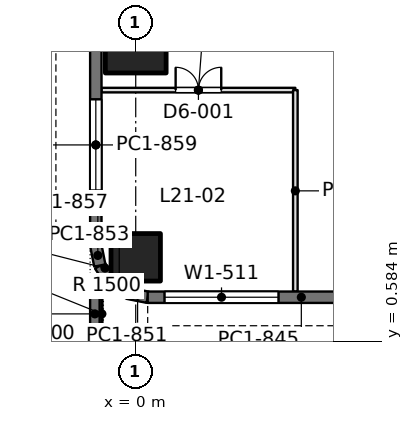
"""IFC4 building model, lengths in metres.
Left out: names, types, materials, properties, quantities, classifications, styles, units other than length and angle.
Written with IfcOpenShell. Run it as: python <this file> out.ifc"""

import sys

from ifc_helpers import new_model, si_unit, direction, frame, frame_2d, origin, origin_2d, place, context, subcontext, project, spatial, rectangle, extrude, element, fill, save


model = new_model("IFC4")
c1 = context("Model", 3, precision=1e-05, world=origin(), true_north=direction((0.0, 1.0)))
c2 = subcontext(c1, "Body", "Model", "MODEL_VIEW")
j1 = project(units=[si_unit("LENGTHUNIT", "METRE"), si_unit("PLANEANGLEUNIT", "RADIAN")], contexts=[c1])
p1 = place(None, origin())
s1 = spatial("IfcSite", under=j1, at=p1, CompositionType="ELEMENT")
p2 = place(p1, origin())
s2 = spatial("IfcBuilding", under=s1, at=p2, CompositionType="ELEMENT")
p3 = place(p2, frame((0.0, 0.0, 96.3)))
s3 = spatial("IfcBuildingStorey", under=s2, at=p3, CompositionType="ELEMENT", Elevation=96.3)
p4 = place(p3, frame((0.0, 2.8, -0.36), z_axis=(0.0, 0.0, 1.0), x_axis=(1.0, 0.0, 0.0)))
e1 = element("IfcColumn", 1, at=p4, inside=s3, PredefinedType="COLUMN", context=c2, shape_type="SweptSolid", body=[
    extrude(rectangle(XDim=1.3, YDim=1.25, at=origin_2d()), origin(), (0.0, 0.0, 1.0), 4.86),
])
p5 = place(p3, frame((0.0, 8.4, 0.0), z_axis=(0.0, 0.0, 1.0), x_axis=(0.0, 1.0, 0.0)))
e2 = element("IfcColumn", 2, at=p5, inside=s3, PredefinedType="COLUMN", context=c2, shape_type="SweptSolid", body=[
    extrude(rectangle(XDim=1.5, YDim=1.6, at=origin_2d()), origin(), (0.0, 0.0, 1.0), 4.5),
])
p6 = place(p3, frame((8.4, 1.75, 0.0), z_axis=(0.0, 0.0, 1.0), x_axis=(-1.0, 0.0, 0.0)))
e3 = element("IfcWall", 3, at=p6, inside=s3, PredefinedType="SOLIDWALL", context=c2, shape_type="SweptSolid", body=[
    extrude(rectangle(XDim=8.085, YDim=0.3, at=frame_2d((4.042, 0.0))), origin(), (0.0, 0.0, 1.0), 4.35),
])
p7 = place(p6, frame((4.643, 0.0, 0.9)))
e4 = element("IfcOpeningElement", 4, at=p7, cuts=e3, PredefinedType="OPENING", context=c2, shape_type="SweptSolid", body=[
    extrude(rectangle(XDim=3.0, YDim=1.9, at=frame_2d((1.5, 0.95))), frame((0.0, 0.16, 0.0), z_axis=(0.0, -1.0, 0.0), x_axis=(1.0, 0.0, 0.0)), (0.0, 0.0, 1.0), 0.32),
])
p8 = place(p6, frame((1.443, 0.0, 0.0)))
e5 = element("IfcOpeningElement", 5, at=p8, cuts=e3, PredefinedType="OPENING", context=c2, shape_type="SweptSolid", body=[
    extrude(rectangle(XDim=1.0, YDim=2.4, at=frame_2d((0.5, 1.2))), frame((0.0, 0.16, 0.0), z_axis=(0.0, -1.0, 0.0), x_axis=(1.0, 0.0, 0.0)), (0.0, 0.0, 1.0), 0.32),
])
p9 = place(p3, frame((0.315, 1.75, 0.0), z_axis=(0.0, 0.0, 1.0), x_axis=(-0.980788534345, 0.195073962632, 0.0)))
e6 = element("IfcWall", 6, at=p9, inside=s3, PredefinedType="SOLIDWALL", context=c2, shape_type="SweptSolid", body=[
    extrude(rectangle(XDim=0.541, YDim=0.3, at=frame_2d((0.271, 0.0))), origin(), (0.0, 0.0, 1.0), 4.35),
])
for number, where, z_axis, x_axis in (
    (7, (-0.216, 1.855, 0.0), (0.0, 0.0, 1.0), (-0.831, 0.556, 0.0)),
    (8, (-0.653, 2.147, 0.0), (0.0, 0.0, 1.0), (-0.556, 0.831, 0.0)),
):
    element("IfcWall", number, at=place(p3, frame(where, z_axis=z_axis, x_axis=x_axis)), inside=s3, PredefinedType="SOLIDWALL", context=c2, shape_type="SweptSolid", body=[
        extrude(rectangle(XDim=0.526, YDim=0.3, at=frame_2d((0.263, 0.0))), origin(), (0.0, 0.0, 1.0), 4.35),
    ])
p10 = place(p3, frame((-0.945, 2.584, 0.0), z_axis=(0.0, 0.0, 1.0), x_axis=(-0.195073962632, 0.980788534345, 0.0)))
e9 = element("IfcWall", 9, at=p10, inside=s3, PredefinedType="SOLIDWALL", context=c2, shape_type="SweptSolid", body=[
    extrude(rectangle(XDim=0.541, YDim=0.3, at=frame_2d((0.271, 0.0))), origin(), (0.0, 0.0, 1.0), 4.35),
])
p11 = place(p3, frame((-1.05, 3.115, 0.0), z_axis=(0.0, 0.0, 1.0), x_axis=(0.0, 1.0, 0.0)))
e10 = element("IfcWall", 10, at=p11, inside=s3, PredefinedType="SOLIDWALL", context=c2, shape_type="SweptSolid", body=[
    extrude(rectangle(XDim=5.285, YDim=0.3, at=frame_2d((2.643, 0.0))), origin(), (0.0, 0.0, 1.0), 4.35),
])
p12 = place(p11, frame((1.443, 0.0, 0.9)))
e11 = element("IfcOpeningElement", 11, at=p12, cuts=e10, PredefinedType="OPENING", context=c2, shape_type="SweptSolid", body=[
    extrude(rectangle(XDim=2.4, YDim=1.9, at=frame_2d((1.2, 0.95))), frame((0.0, 0.16, 0.0), z_axis=(0.0, -1.0, 0.0), x_axis=(1.0, 0.0, 0.0)), (0.0, 0.0, 1.0), 0.32),
])
p13 = place(p3, frame((-1.075, 0.3, -0.16), z_axis=(0.0, 0.0, 1.0), x_axis=(0.0, 1.0, 0.0)))
e12 = element("IfcWall", 12, at=p13, inside=s3, PredefinedType="PARAPET", context=c2, shape_type="SweptSolid", body=[
    extrude(rectangle(XDim=2.023, YDim=0.25, at=frame_2d((1.012, 0.0))), origin(), (0.0, 0.0, 1.0), 1.26),
])
p14 = place(p3, frame((-0.902, 7.2, 0.0), z_axis=(0.0, 0.0, 1.0), x_axis=(1.0, 0.0, 0.0)))
e13 = element("IfcWall", 13, at=p14, inside=s3, PredefinedType="PARTITIONING", context=c2, shape_type="SweptSolid", body=[
    extrude(rectangle(XDim=5.102, YDim=0.12, at=frame_2d((2.551, 0.0))), origin(), (0.0, 0.0, 1.0), 3.86),
])
p15 = place(p14, frame((1.952, 0.0, 0.0)))
e14 = element("IfcOpeningElement", 14, at=p15, cuts=e13, PredefinedType="OPENING", context=c2, shape_type="SweptSolid", body=[
    extrude(rectangle(XDim=1.2, YDim=2.2, at=frame_2d((0.6, 1.1))), frame((0.0, 0.07, 0.0), z_axis=(0.0, -1.0, 0.0), x_axis=(1.0, 0.0, 0.0)), (0.0, 0.0, 1.0), 0.14),
])
p16 = place(p3, frame((4.2, 1.898, 0.0), z_axis=(0.0, 0.0, 1.0), x_axis=(0.0, 1.0, 0.0)))
e15 = element("IfcWall", 15, at=p16, inside=s3, PredefinedType="PARTITIONING", context=c2, shape_type="SweptSolid", body=[
    extrude(rectangle(XDim=5.302, YDim=0.12, at=frame_2d((2.651, 0.0))), origin(), (0.0, 0.0, 1.0), 3.86),
])
p17 = place(p7, origin())
e16 = element("IfcWindow", 16, at=p17, inside=s3, PartitioningType="SINGLE_PANEL", PredefinedType="WINDOW", context=c2, shape_type="SweptSolid", body=[
    extrude(rectangle(XDim=3.0, YDim=1.9, at=frame_2d((1.5, 0.95))), frame((0.0, 0.03, 0.0), z_axis=(0.0, -1.0, 0.0), x_axis=(1.0, 0.0, 0.0)), (0.0, 0.0, 1.0), 0.06),
])
fill(e4, e16)
p18 = place(p12, origin())
e17 = element("IfcWindow", 17, at=p18, inside=s3, PartitioningType="SINGLE_PANEL", PredefinedType="WINDOW", context=c2, shape_type="SweptSolid", body=[
    extrude(rectangle(XDim=2.4, YDim=1.9, at=frame_2d((1.2, 0.95))), frame((0.0, 0.03, 0.0), z_axis=(0.0, -1.0, 0.0), x_axis=(1.0, 0.0, 0.0)), (0.0, 0.0, 1.0), 0.06),
])
fill(e11, e17)
p19 = place(p15, origin())
e18 = element("IfcDoor", 18, at=p19, inside=s3, OperationType="DOUBLE_DOOR_SINGLE_SWING_OPPOSITE_LEFT", PredefinedType="DOOR", context=c2, shape_type="SweptSolid", body=[
    extrude(rectangle(XDim=1.2, YDim=2.2, at=frame_2d((0.6, 1.1))), frame((0.0, 0.025, 0.0), z_axis=(0.0, -1.0, 0.0), x_axis=(1.0, 0.0, 0.0)), (0.0, 0.0, 1.0), 0.05),
])
fill(e14, e18)
save(model, sys.argv[1])
